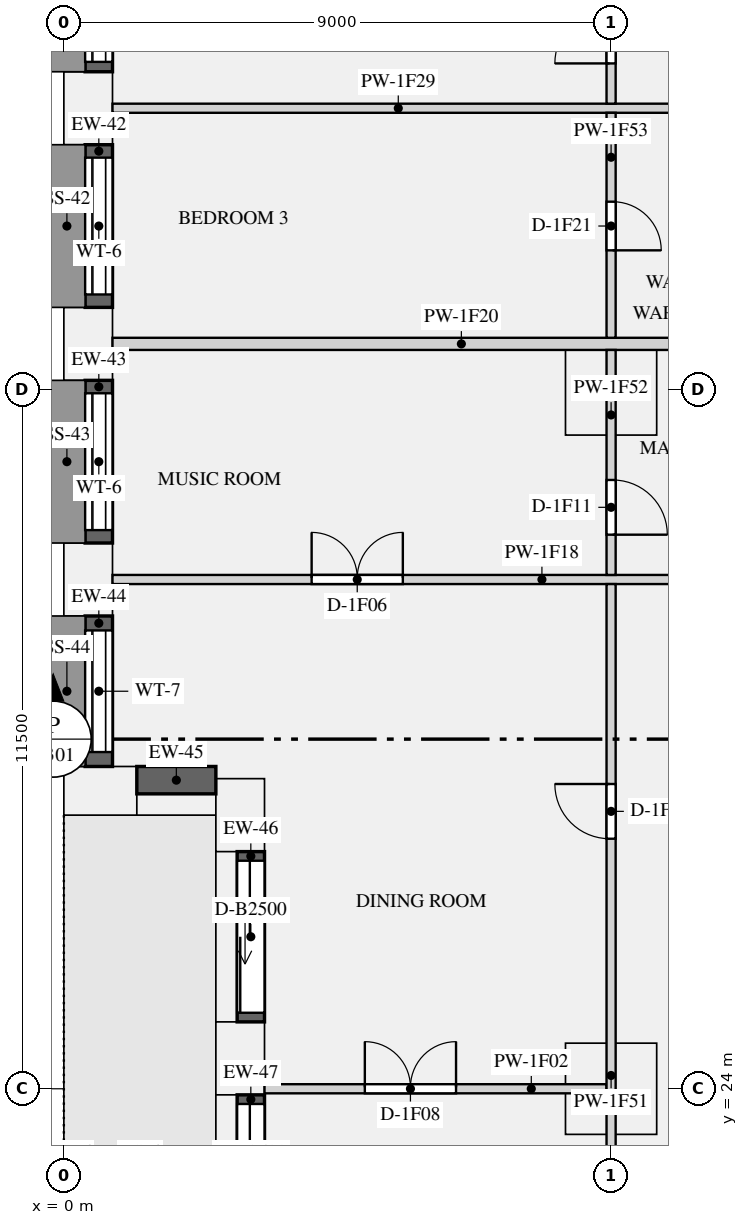
"""IFC4 building model, lengths in metres.
Left out: names, types, materials, properties, quantities, classifications, styles, units other than length and angle.
Written with IfcOpenShell. Run it as: python <this file> out.ifc"""

import sys

from ifc_helpers import new_model, si_unit, direction, frame, frame_2d, origin, origin_2d, place, context, subcontext, project, spatial, rectangle, extrude, element, fill, save


model = new_model("IFC4")
c1 = context("Model", 3, precision=1e-05, world=origin(), true_north=direction((0.0, 1.0)))
c2 = subcontext(c1, "Body", "Model", "MODEL_VIEW")
j1 = project(units=[si_unit("LENGTHUNIT", "METRE"), si_unit("PLANEANGLEUNIT", "RADIAN")], contexts=[c1])
p1 = place(None, origin())
s1 = spatial("IfcSite", under=j1, at=p1, CompositionType="ELEMENT")
p2 = place(p1, origin())
s2 = spatial("IfcBuilding", under=s1, at=p2, CompositionType="ELEMENT")
p3 = place(p2, frame((0.0, 0.0, 60.45)))
s3 = spatial("IfcBuildingStorey", under=s2, at=p3, CompositionType="ELEMENT", Elevation=60.45)
for number, where, z_axis, x_axis in (
    (1, (0.4, 40.125, 0.0), (0.0, 0.0, 1.0), (0.0, -1.0, 0.0)),
    (2, (0.4, 36.25, 0.0), (0.0, 0.0, 1.0), (0.0, -1.0, 0.0)),
    (3, (0.4, 32.375, 0.0), (0.0, 0.0, 1.0), (0.0, -1.0, 0.0)),
    (4, (0.6, 28.9, 0.0), (0.0, 0.0, 1.0), (1.0, 0.0, 0.0)),
    (5, (2.9, 28.5, 0.0), (0.0, 0.0, 1.0), (0.0, -1.0, 0.0)),
    (6, (2.9, 24.5, 0.0), (0.0, 0.0, 1.0), (0.0, -1.0, 0.0)),
):
    element("IfcColumn", number, at=place(p3, frame(where, z_axis=z_axis, x_axis=x_axis)), inside=s3, PredefinedType="USERDEFINED", context=c2, shape_type="SweptSolid", body=[
        extrude(rectangle(XDim=1.2, YDim=0.8, at=origin_2d()), origin(), (0.0, 0.0, 1.0), 3.15),
    ])
for number, where, z_axis, x_axis in (
    (7, (9.0, 24.0, 0.0), (0.0, 0.0, 1.0), (1.0, 0.0, 0.0)),
    (8, (9.0, 35.5, 0.0), (0.0, 0.0, 1.0), (1.0, 0.0, 0.0)),
):
    element("IfcColumn", number, at=place(p3, frame(where, z_axis=z_axis, x_axis=x_axis)), inside=s3, PredefinedType="COLUMN", context=c2, shape_type="SweptSolid", body=[
        extrude(rectangle(XDim=1.5, YDim=1.5, at=origin_2d()), origin(), (0.0, 0.0, 1.0), 3.15),
    ])
p4 = place(p3, frame((0.575, 42.8, 0.9), z_axis=(0.0, 0.0, 1.0), x_axis=(0.0, -1.0, 0.0)))
e9 = element("IfcWall", 9, at=p4, inside=s3, PredefinedType="SOLIDWALL", context=c2, shape_type="SweptSolid", body=[
    extrude(rectangle(XDim=2.075, YDim=0.45, at=frame_2d((1.038, 0.0))), origin(), (0.0, 0.0, 1.0), 1.93),
])
p5 = place(p4, frame((0.163, 0.0, 0.15)))
e10 = element("IfcOpeningElement", 10, at=p5, cuts=e9, PredefinedType="OPENING", context=c2, shape_type="SweptSolid", body=[
    extrude(rectangle(XDim=1.75, YDim=1.5, at=frame_2d((0.875, 0.75))), frame((0.0, 0.235, 0.0), z_axis=(0.0, -1.0, 0.0), x_axis=(1.0, 0.0, 0.0)), (0.0, 0.0, 1.0), 0.47),
])
p6 = place(p3, frame((0.575, 39.525, 0.9), z_axis=(0.0, 0.0, 1.0), x_axis=(0.0, -1.0, 0.0)))
e11 = element("IfcWall", 11, at=p6, inside=s3, PredefinedType="SOLIDWALL", context=c2, shape_type="SweptSolid", body=[
    extrude(rectangle(XDim=2.675, YDim=0.45, at=frame_2d((1.337, 0.0))), origin(), (0.0, 0.0, 1.0), 1.93),
])
p7 = place(p6, frame((0.212, 0.0, 0.15)))
e12 = element("IfcOpeningElement", 12, at=p7, cuts=e11, PredefinedType="OPENING", context=c2, shape_type="SweptSolid", body=[
    extrude(rectangle(XDim=2.25, YDim=1.5, at=frame_2d((1.125, 0.75))), frame((0.0, 0.235, 0.0), z_axis=(0.0, -1.0, 0.0), x_axis=(1.0, 0.0, 0.0)), (0.0, 0.0, 1.0), 0.47),
])
p8 = place(p3, frame((0.575, 35.65, 0.9), z_axis=(0.0, 0.0, 1.0), x_axis=(0.0, -1.0, 0.0)))
e13 = element("IfcWall", 13, at=p8, inside=s3, PredefinedType="SOLIDWALL", context=c2, shape_type="SweptSolid", body=[
    extrude(rectangle(XDim=2.675, YDim=0.45, at=frame_2d((1.337, 0.0))), origin(), (0.0, 0.0, 1.0), 1.93),
])
p9 = place(p8, frame((0.212, 0.0, 0.15)))
e14 = element("IfcOpeningElement", 14, at=p9, cuts=e13, PredefinedType="OPENING", context=c2, shape_type="SweptSolid", body=[
    extrude(rectangle(XDim=2.25, YDim=1.5, at=frame_2d((1.125, 0.75))), frame((0.0, 0.235, 0.0), z_axis=(0.0, -1.0, 0.0), x_axis=(1.0, 0.0, 0.0)), (0.0, 0.0, 1.0), 0.47),
])
p10 = place(p3, frame((0.575, 31.775, 0.9), z_axis=(0.0, 0.0, 1.0), x_axis=(0.0, -1.0, 0.0)))
e15 = element("IfcWall", 15, at=p10, inside=s3, PredefinedType="SOLIDWALL", context=c2, shape_type="SweptSolid", body=[
    extrude(rectangle(XDim=2.475, YDim=0.45, at=frame_2d((1.237, 0.0))), origin(), (0.0, 0.0, 1.0), 1.93),
])
p11 = place(p10, frame((0.238, 0.0, 0.15)))
e16 = element("IfcOpeningElement", 16, at=p11, cuts=e15, PredefinedType="OPENING", context=c2, shape_type="SweptSolid", body=[
    extrude(rectangle(XDim=2.0, YDim=1.5, at=frame_2d((1.0, 0.75))), frame((0.0, 0.235, 0.0), z_axis=(0.0, -1.0, 0.0), x_axis=(1.0, 0.0, 0.0)), (0.0, 0.0, 1.0), 0.47),
])
p12 = place(p3, frame((1.2, 29.075, 0.9), z_axis=(0.0, 0.0, 1.0), x_axis=(1.0, 0.0, 0.0)))
e17 = element("IfcWall", 17, at=p12, inside=s3, PredefinedType="SOLIDWALL", context=c2, shape_type="SweptSolid", body=[
    extrude(rectangle(XDim=1.3, YDim=0.45, at=frame_2d((0.65, 0.0))), origin(), (0.0, 0.0, 1.0), 1.93),
])
p13 = place(p3, frame((3.075, 27.9, 0.0), z_axis=(0.0, 0.0, 1.0), x_axis=(0.0, -1.0, 0.0)))
e18 = element("IfcWall", 18, at=p13, inside=s3, PredefinedType="SOLIDWALL", context=c2, shape_type="SweptSolid", body=[
    extrude(rectangle(XDim=2.8, YDim=0.45, at=frame_2d((1.4, 0.0))), origin(), (0.0, 0.0, 1.0), 2.83),
])
p14 = place(p13, frame((0.15, 0.0, 0.0)))
e19 = element("IfcOpeningElement", 19, at=p14, cuts=e18, PredefinedType="OPENING", context=c2, shape_type="SweptSolid", body=[
    extrude(rectangle(XDim=2.5, YDim=2.3, at=frame_2d((1.25, 1.15))), frame((0.0, 0.235, 0.0), z_axis=(0.0, -1.0, 0.0), x_axis=(1.0, 0.0, 0.0)), (0.0, 0.0, 1.0), 0.47),
])
p15 = place(p3, frame((3.075, 23.9, 0.0), z_axis=(0.0, 0.0, 1.0), x_axis=(0.0, -1.0, 0.0)))
e20 = element("IfcWall", 20, at=p15, inside=s3, PredefinedType="SOLIDWALL", context=c2, shape_type="SweptSolid", body=[
    extrude(rectangle(XDim=2.8, YDim=0.45, at=frame_2d((1.4, 0.0))), origin(), (0.0, 0.0, 1.0), 2.83),
])
p16 = place(p15, frame((0.15, 0.0, 0.0)))
e21 = element("IfcOpeningElement", 21, at=p16, cuts=e20, PredefinedType="OPENING", context=c2, shape_type="SweptSolid", body=[
    extrude(rectangle(XDim=2.5, YDim=2.3, at=frame_2d((1.25, 1.15))), frame((0.0, 0.235, 0.0), z_axis=(0.0, -1.0, 0.0), x_axis=(1.0, 0.0, 0.0)), (0.0, 0.0, 1.0), 0.47),
])
p17 = place(p3, frame((3.3, 24.0, 0.0), z_axis=(0.0, 0.0, 1.0), x_axis=(1.0, 0.0, 0.0)))
e22 = element("IfcWall", 22, at=p17, inside=s3, PredefinedType="PARTITIONING", context=c2, shape_type="SweptSolid", body=[
    extrude(rectangle(XDim=5.625, YDim=0.15, at=frame_2d((2.812, 0.0))), origin(), (0.0, 0.0, 1.0), 2.83),
])
p18 = place(p17, frame((1.65, 0.0, 0.0)))
e23 = element("IfcOpeningElement", 23, at=p18, cuts=e22, PredefinedType="OPENING", context=c2, shape_type="SweptSolid", body=[
    extrude(rectangle(XDim=1.5, YDim=2.1, at=frame_2d((0.75, 1.05))), frame((0.0, 0.085, 0.0), z_axis=(0.0, -1.0, 0.0), x_axis=(1.0, 0.0, 0.0)), (0.0, 0.0, 1.0), 0.17),
])
p19 = place(p3, frame((0.8, 32.375, 0.0), z_axis=(0.0, 0.0, 1.0), x_axis=(1.0, 0.0, 0.0)))
e24 = element("IfcWall", 24, at=p19, inside=s3, PredefinedType="PARTITIONING", context=c2, shape_type="SweptSolid", body=[
    extrude(rectangle(XDim=11.4, YDim=0.15, at=frame_2d((5.7, 0.0))), origin(), (0.0, 0.0, 1.0), 2.83),
])
p20 = place(p19, frame((3.275, 0.0, 0.0)))
e25 = element("IfcOpeningElement", 25, at=p20, cuts=e24, PredefinedType="OPENING", context=c2, shape_type="SweptSolid", body=[
    extrude(rectangle(XDim=1.5, YDim=2.1, at=frame_2d((0.75, 1.05))), frame((0.0, 0.085, 0.0), z_axis=(0.0, -1.0, 0.0), x_axis=(1.0, 0.0, 0.0)), (0.0, 0.0, 1.0), 0.17),
])
p21 = place(p19, frame((9.35, 0.0, 0.0)))
e26 = element("IfcOpeningElement", 26, at=p21, cuts=e24, PredefinedType="OPENING", context=c2, shape_type="SweptSolid", body=[
    extrude(rectangle(XDim=0.9, YDim=2.1, at=frame_2d((0.45, 1.05))), frame((0.0, 0.085, 0.0), z_axis=(0.0, -1.0, 0.0), x_axis=(1.0, 0.0, 0.0)), (0.0, 0.0, 1.0), 0.17),
])
p22 = place(p3, frame((0.8, 36.25, 0.0), z_axis=(0.0, 0.0, 1.0), x_axis=(1.0, 0.0, 0.0)))
e27 = element("IfcWall", 27, at=p22, inside=s3, PredefinedType="PARTITIONING", context=c2, shape_type="SweptSolid", body=[
    extrude(rectangle(XDim=11.475, YDim=0.2, at=frame_2d((5.737, 0.0))), origin(), (0.0, 0.0, 1.0), 2.83),
])
p23 = place(p3, frame((0.8, 40.125, 0.0), z_axis=(0.0, 0.0, 1.0), x_axis=(1.0, 0.0, 0.0)))
e28 = element("IfcWall", 28, at=p23, inside=s3, PredefinedType="PARTITIONING", context=c2, shape_type="SweptSolid", body=[
    extrude(rectangle(XDim=11.475, YDim=0.15, at=frame_2d((5.737, 0.0))), origin(), (0.0, 0.0, 1.0), 2.83),
])
p24 = place(p23, frame((9.4, 0.0, 0.0)))
e29 = element("IfcOpeningElement", 29, at=p24, cuts=e28, PredefinedType="OPENING", context=c2, shape_type="SweptSolid", body=[
    extrude(rectangle(XDim=0.8, YDim=2.1, at=frame_2d((0.4, 1.05))), frame((0.0, 0.085, 0.0), z_axis=(0.0, -1.0, 0.0), x_axis=(1.0, 0.0, 0.0)), (0.0, 0.0, 1.0), 0.17),
])
p25 = place(p3, frame((9.0, 12.575, 0.0), z_axis=(0.0, 0.0, 1.0), x_axis=(0.0, 1.0, 0.0)))
e30 = element("IfcWall", 30, at=p25, inside=s3, PredefinedType="PARTITIONING", context=c2, shape_type="SweptSolid", body=[
    extrude(rectangle(XDim=19.725, YDim=0.15, at=frame_2d((9.863, 0.0))), origin(), (0.0, 0.0, 1.0), 2.83),
])
p26 = place(p25, frame((15.537, 0.0, 0.0)))
e31 = element("IfcOpeningElement", 31, at=p26, cuts=e30, PredefinedType="OPENING", context=c2, shape_type="SweptSolid", body=[
    extrude(rectangle(XDim=0.9, YDim=2.1, at=frame_2d((0.45, 1.05))), frame((0.0, 0.085, 0.0), z_axis=(0.0, -1.0, 0.0), x_axis=(1.0, 0.0, 0.0)), (0.0, 0.0, 1.0), 0.17),
])
p27 = place(p25, frame((6.85, 0.0, 0.0)))
e32 = element("IfcOpeningElement", 32, at=p27, cuts=e30, PredefinedType="OPENING", context=c2, shape_type="SweptSolid", body=[
    extrude(rectangle(XDim=0.9, YDim=2.1, at=frame_2d((0.45, 1.05))), frame((0.0, 0.085, 0.0), z_axis=(0.0, -1.0, 0.0), x_axis=(1.0, 0.0, 0.0)), (0.0, 0.0, 1.0), 0.17),
])
p28 = place(p3, frame((9.0, 32.45, 0.0), z_axis=(0.0, 0.0, 1.0), x_axis=(0.0, 1.0, 0.0)))
e33 = element("IfcWall", 33, at=p28, inside=s3, PredefinedType="PARTITIONING", context=c2, shape_type="SweptSolid", body=[
    extrude(rectangle(XDim=3.7, YDim=0.15, at=frame_2d((1.85, 0.0))), origin(), (0.0, 0.0, 1.0), 2.83),
])
p29 = place(p28, frame((0.662, 0.0, 0.0)))
e34 = element("IfcOpeningElement", 34, at=p29, cuts=e33, PredefinedType="OPENING", context=c2, shape_type="SweptSolid", body=[
    extrude(rectangle(XDim=0.9, YDim=2.1, at=frame_2d((0.45, 1.05))), frame((0.0, 0.085, 0.0), z_axis=(0.0, -1.0, 0.0), x_axis=(1.0, 0.0, 0.0)), (0.0, 0.0, 1.0), 0.17),
])
p30 = place(p3, frame((9.0, 36.35, 0.0), z_axis=(0.0, 0.0, 1.0), x_axis=(0.0, 1.0, 0.0)))
e35 = element("IfcWall", 35, at=p30, inside=s3, PredefinedType="PARTITIONING", context=c2, shape_type="SweptSolid", body=[
    extrude(rectangle(XDim=3.7, YDim=0.15, at=frame_2d((1.85, 0.0))), origin(), (0.0, 0.0, 1.0), 2.83),
])
p31 = place(p30, frame((1.438, 0.0, 0.0)))
e36 = element("IfcOpeningElement", 36, at=p31, cuts=e35, PredefinedType="OPENING", context=c2, shape_type="SweptSolid", body=[
    extrude(rectangle(XDim=0.8, YDim=2.1, at=frame_2d((0.4, 1.05))), frame((0.0, 0.085, 0.0), z_axis=(0.0, -1.0, 0.0), x_axis=(1.0, 0.0, 0.0)), (0.0, 0.0, 1.0), 0.17),
])
p32 = place(p3, frame((9.0, 40.2, 0.0), z_axis=(0.0, 0.0, 1.0), x_axis=(0.0, 1.0, 0.0)))
e37 = element("IfcWall", 37, at=p32, inside=s3, PredefinedType="PARTITIONING", context=c2, shape_type="SweptSolid", body=[
    extrude(rectangle(XDim=7.5, YDim=0.15, at=frame_2d((3.75, 0.0))), origin(), (0.0, 0.0, 1.0), 2.83),
])
p33 = place(p32, frame((6.075, 0.0, 0.0)))
e38 = element("IfcOpeningElement", 38, at=p33, cuts=e37, PredefinedType="OPENING", context=c2, shape_type="SweptSolid", body=[
    extrude(rectangle(XDim=0.8, YDim=2.1, at=frame_2d((0.4, 1.05))), frame((0.0, 0.085, 0.0), z_axis=(0.0, -1.0, 0.0), x_axis=(1.0, 0.0, 0.0)), (0.0, 0.0, 1.0), 0.17),
])
p34 = place(p32, frame((3.4, 0.0, 0.0)))
e39 = element("IfcOpeningElement", 39, at=p34, cuts=e37, PredefinedType="OPENING", context=c2, shape_type="SweptSolid", body=[
    extrude(rectangle(XDim=0.8, YDim=2.1, at=frame_2d((0.4, 1.05))), frame((0.0, 0.085, 0.0), z_axis=(0.0, -1.0, 0.0), x_axis=(1.0, 0.0, 0.0)), (0.0, 0.0, 1.0), 0.17),
])
p35 = place(p32, frame((0.662, 0.0, 0.0)))
e40 = element("IfcOpeningElement", 40, at=p35, cuts=e37, PredefinedType="OPENING", context=c2, shape_type="SweptSolid", body=[
    extrude(rectangle(XDim=0.9, YDim=2.1, at=frame_2d((0.45, 1.05))), frame((0.0, 0.085, 0.0), z_axis=(0.0, -1.0, 0.0), x_axis=(1.0, 0.0, 0.0)), (0.0, 0.0, 1.0), 0.17),
])
p36 = place(p5, origin())
e41 = element("IfcWindow", 41, at=p36, inside=s3, PartitioningType="SINGLE_PANEL", PredefinedType="WINDOW", context=c2, shape_type="SweptSolid", body=[
    extrude(rectangle(XDim=1.75, YDim=1.5, at=frame_2d((0.875, 0.75))), frame((0.0, -0.065, 0.0), z_axis=(0.0, -1.0, 0.0), x_axis=(1.0, 0.0, 0.0)), (0.0, 0.0, 1.0), 0.06),
])
fill(e10, e41)
p37 = place(p7, origin())
e42 = element("IfcWindow", 42, at=p37, inside=s3, PartitioningType="SINGLE_PANEL", PredefinedType="WINDOW", context=c2, shape_type="SweptSolid", body=[
    extrude(rectangle(XDim=2.25, YDim=1.5, at=frame_2d((1.125, 0.75))), frame((0.0, -0.065, 0.0), z_axis=(0.0, -1.0, 0.0), x_axis=(1.0, 0.0, 0.0)), (0.0, 0.0, 1.0), 0.06),
])
fill(e12, e42)
p38 = place(p9, origin())
e43 = element("IfcWindow", 43, at=p38, inside=s3, PartitioningType="SINGLE_PANEL", PredefinedType="WINDOW", context=c2, shape_type="SweptSolid", body=[
    extrude(rectangle(XDim=2.25, YDim=1.5, at=frame_2d((1.125, 0.75))), frame((0.0, -0.065, 0.0), z_axis=(0.0, -1.0, 0.0), x_axis=(1.0, 0.0, 0.0)), (0.0, 0.0, 1.0), 0.06),
])
fill(e14, e43)
p39 = place(p11, origin())
e44 = element("IfcWindow", 44, at=p39, inside=s3, PartitioningType="SINGLE_PANEL", PredefinedType="WINDOW", context=c2, shape_type="SweptSolid", body=[
    extrude(rectangle(XDim=2.0, YDim=1.5, at=frame_2d((1.0, 0.75))), frame((0.0, -0.065, 0.0), z_axis=(0.0, -1.0, 0.0), x_axis=(1.0, 0.0, 0.0)), (0.0, 0.0, 1.0), 0.06),
])
fill(e16, e44)
p40 = place(p14, origin())
e45 = element("IfcDoor", 45, at=p40, inside=s3, OperationType="SLIDING_TO_LEFT", PredefinedType="DOOR", context=c2, shape_type="SweptSolid", body=[
    extrude(rectangle(XDim=2.5, YDim=2.3, at=frame_2d((1.25, 1.15))), frame((0.0, -0.07, 0.0), z_axis=(0.0, -1.0, 0.0), x_axis=(1.0, 0.0, 0.0)), (0.0, 0.0, 1.0), 0.05),
])
fill(e19, e45)
p41 = place(p16, origin())
e46 = element("IfcDoor", 46, at=p41, inside=s3, OperationType="SLIDING_TO_LEFT", PredefinedType="DOOR", context=c2, shape_type="SweptSolid", body=[
    extrude(rectangle(XDim=2.5, YDim=2.3, at=frame_2d((1.25, 1.15))), frame((0.0, -0.07, 0.0), z_axis=(0.0, -1.0, 0.0), x_axis=(1.0, 0.0, 0.0)), (0.0, 0.0, 1.0), 0.05),
])
fill(e21, e46)
p42 = place(p20, origin())
e47 = element("IfcDoor", 47, at=p42, inside=s3, OperationType="DOUBLE_DOOR_SINGLE_SWING", PredefinedType="DOOR", context=c2, shape_type="SweptSolid", body=[
    extrude(rectangle(XDim=1.5, YDim=2.1, at=frame_2d((0.75, 1.05))), frame((0.0, 0.025, 0.0), z_axis=(0.0, -1.0, 0.0), x_axis=(1.0, 0.0, 0.0)), (0.0, 0.0, 1.0), 0.05),
])
fill(e25, e47)
p43 = place(p26, origin())
e48 = element("IfcDoor", 48, at=p43, inside=s3, OperationType="SINGLE_SWING_RIGHT", PredefinedType="DOOR", context=c2, shape_type="SweptSolid", body=[
    extrude(rectangle(XDim=0.9, YDim=2.1, at=frame_2d((0.45, 1.05))), frame((0.0, 0.025, 0.0), z_axis=(0.0, -1.0, 0.0), x_axis=(1.0, 0.0, 0.0)), (0.0, 0.0, 1.0), 0.05),
])
fill(e31, e48)
p44 = place(p18, origin())
e49 = element("IfcDoor", 49, at=p44, inside=s3, OperationType="DOUBLE_DOOR_SINGLE_SWING", PredefinedType="DOOR", context=c2, shape_type="SweptSolid", body=[
    extrude(rectangle(XDim=1.5, YDim=2.1, at=frame_2d((0.75, 1.05))), frame((0.0, 0.025, 0.0), z_axis=(0.0, -1.0, 0.0), x_axis=(1.0, 0.0, 0.0)), (0.0, 0.0, 1.0), 0.05),
])
fill(e23, e49)
p45 = place(p29, frame((0.9, 0.0, 0.0), z_axis=(0.0, 0.0, 1.0), x_axis=(-1.0, 0.0, 0.0)))
e50 = element("IfcDoor", 50, at=p45, inside=s3, OperationType="SINGLE_SWING_RIGHT", PredefinedType="DOOR", context=c2, shape_type="SweptSolid", body=[
    extrude(rectangle(XDim=0.9, YDim=2.1, at=frame_2d((0.45, 1.05))), frame((0.0, 0.025, 0.0), z_axis=(0.0, -1.0, 0.0), x_axis=(1.0, 0.0, 0.0)), (0.0, 0.0, 1.0), 0.05),
])
fill(e34, e50)
p46 = place(p31, frame((0.8, 0.0, 0.0), z_axis=(0.0, 0.0, 1.0), x_axis=(-1.0, 0.0, 0.0)))
e51 = element("IfcDoor", 51, at=p46, inside=s3, OperationType="SINGLE_SWING_RIGHT", PredefinedType="DOOR", context=c2, shape_type="SweptSolid", body=[
    extrude(rectangle(XDim=0.8, YDim=2.1, at=frame_2d((0.4, 1.05))), frame((0.0, 0.025, 0.0), z_axis=(0.0, -1.0, 0.0), x_axis=(1.0, 0.0, 0.0)), (0.0, 0.0, 1.0), 0.05),
])
fill(e36, e51)
p47 = place(p35, origin())
e52 = element("IfcDoor", 52, at=p47, inside=s3, OperationType="SINGLE_SWING_LEFT", PredefinedType="DOOR", context=c2, shape_type="SweptSolid", body=[
    extrude(rectangle(XDim=0.9, YDim=2.1, at=frame_2d((0.45, 1.05))), frame((0.0, 0.025, 0.0), z_axis=(0.0, -1.0, 0.0), x_axis=(1.0, 0.0, 0.0)), (0.0, 0.0, 1.0), 0.05),
])
fill(e40, e52)
save(model, sys.argv[1])
